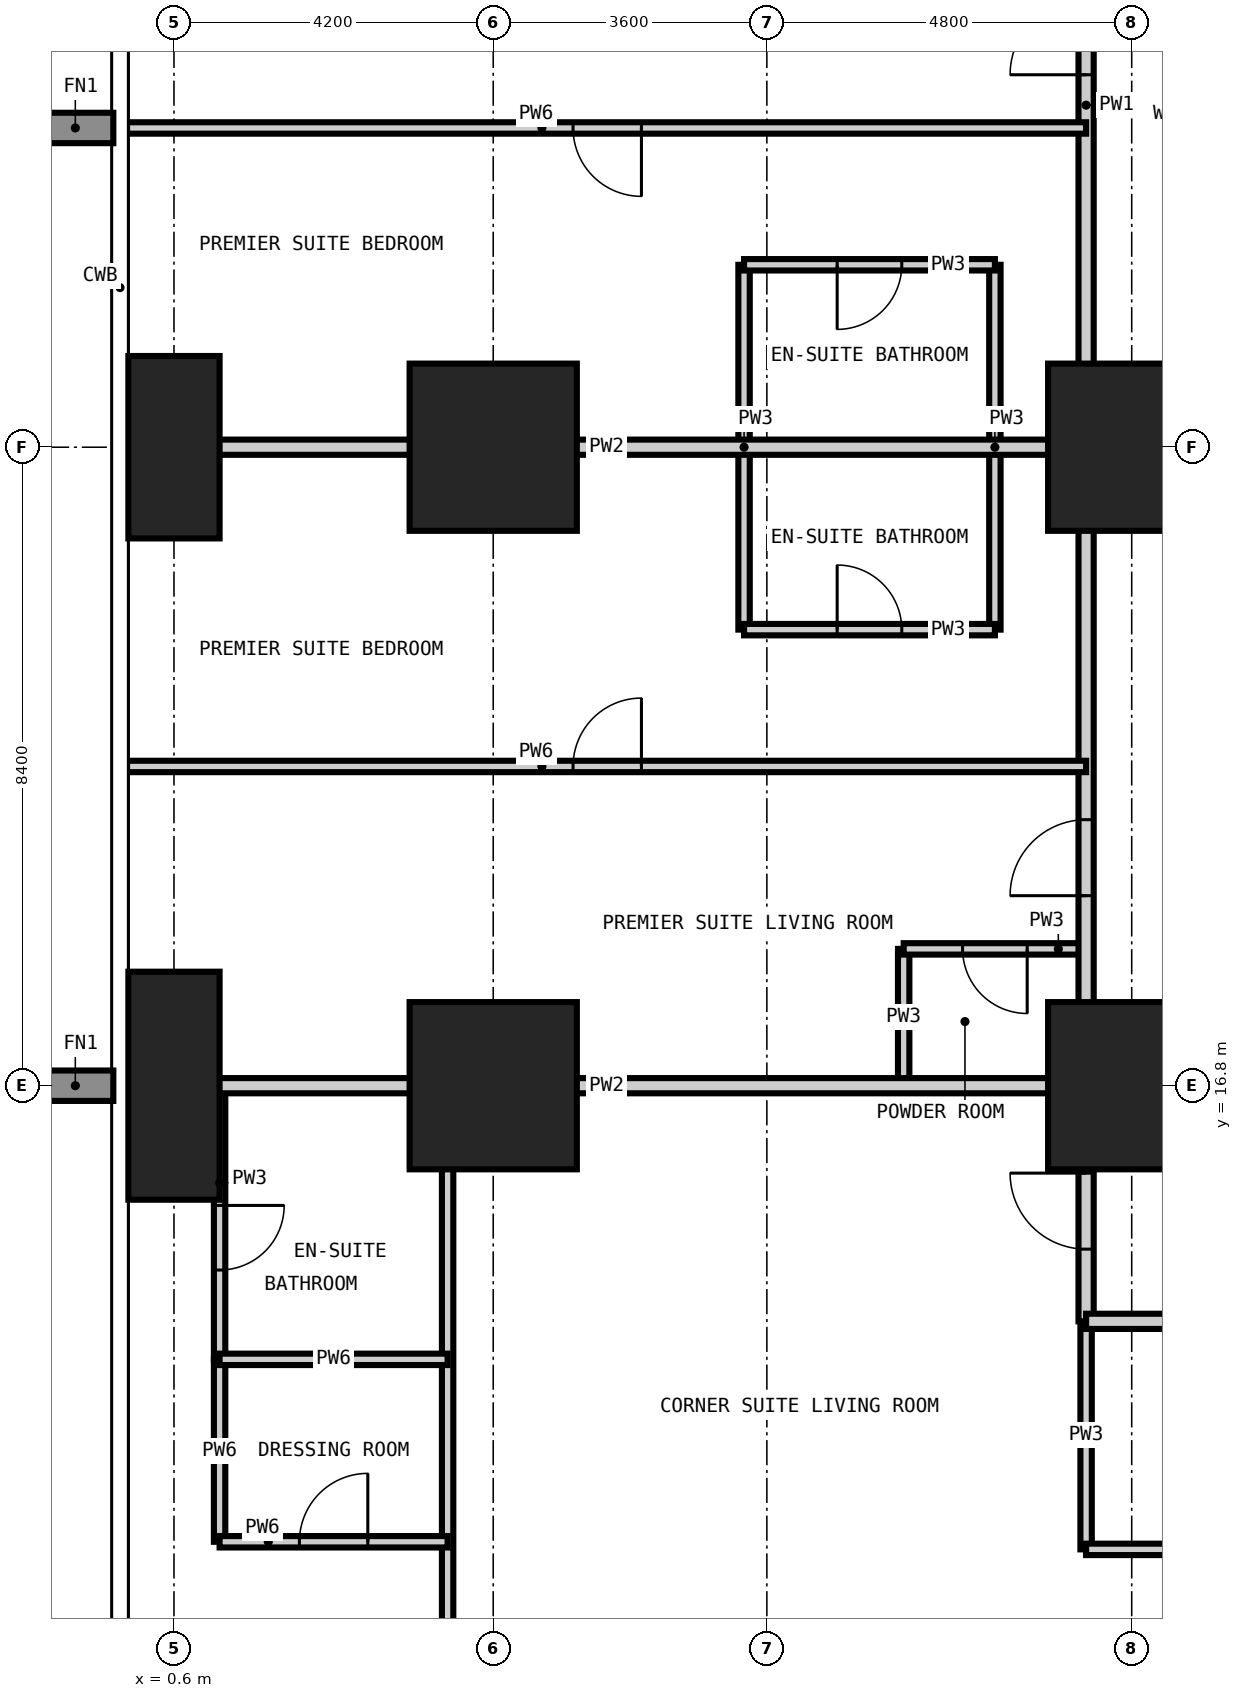
"""IFC4 building model, lengths in metres.
Left out: names, types, materials, properties, quantities, classifications, styles, units other than length and angle.
Written with IfcOpenShell. Run it as: python <this file> out.ifc"""

import sys

from ifc_helpers import new_model, si_unit, direction, frame, frame_2d, origin, origin_2d, place, context, subcontext, project, spatial, rectangle, extrude, element, fill, save


model = new_model("IFC4")
c1 = context("Model", 3, precision=1e-05, world=origin(), true_north=direction((0.0, 1.0)))
c2 = subcontext(c1, "Body", "Model", "MODEL_VIEW")
j1 = project(units=[si_unit("LENGTHUNIT", "METRE"), si_unit("PLANEANGLEUNIT", "RADIAN")], contexts=[c1])
p1 = place(None, origin())
s1 = spatial("IfcSite", under=j1, at=p1, CompositionType="ELEMENT")
p2 = place(p1, origin())
s2 = spatial("IfcBuilding", under=s1, at=p2, CompositionType="ELEMENT")
p3 = place(p2, frame((0.0, 0.0, 97.2)))
s3 = spatial("IfcBuildingStorey", under=s2, at=p3, CompositionType="ELEMENT", Elevation=97.2)
p4 = place(p3, frame((0.6, 16.8, -0.35), z_axis=(0.0, 0.0, 1.0), x_axis=(1.0, 0.0, 0.0)))
e1 = element("IfcColumn", 1, at=p4, inside=s3, PredefinedType="COLUMN", context=c2, shape_type="SweptSolid", body=[
    extrude(rectangle(XDim=1.2, YDim=3.0, at=origin_2d()), origin(), (0.0, 0.0, 1.0), 3.6),
])
p5 = place(p3, frame((0.6, 25.2, -0.35), z_axis=(0.0, 0.0, 1.0), x_axis=(1.0, 0.0, 0.0)))
e2 = element("IfcColumn", 2, at=p5, inside=s3, PredefinedType="COLUMN", context=c2, shape_type="SweptSolid", body=[
    extrude(rectangle(XDim=1.2, YDim=2.4, at=origin_2d()), origin(), (0.0, 0.0, 1.0), 3.6),
])
for number, where, z_axis, x_axis in (
    (3, (4.8, 16.8, -0.35), (0.0, 0.0, 1.0), (1.0, 0.0, 0.0)),
    (4, (4.8, 25.2, -0.35), (0.0, 0.0, 1.0), (1.0, 0.0, 0.0)),
    (5, (13.2, 16.8, -0.35), (0.0, 0.0, 1.0), (1.0, 0.0, 0.0)),
    (6, (13.2, 25.2, -0.35), (0.0, 0.0, 1.0), (1.0, 0.0, 0.0)),
):
    element("IfcColumn", number, at=place(p3, frame(where, z_axis=z_axis, x_axis=x_axis)), inside=s3, PredefinedType="COLUMN", context=c2, shape_type="SweptSolid", body=[
        extrude(rectangle(XDim=2.2, YDim=2.2, at=origin_2d()), origin(), (0.0, 0.0, 1.0), 3.6),
    ])
p6 = place(p3, frame((1.2, 13.2, 0.0), z_axis=(0.0, 0.0, 1.0), x_axis=(0.0, 1.0, 0.0)))
e7 = element("IfcWall", 7, at=p6, inside=s3, PredefinedType="PARTITIONING", context=c2, shape_type="SweptSolid", body=[
    extrude(rectangle(XDim=3.6, YDim=0.15, at=frame_2d((1.8, 0.0))), origin(), (0.0, 0.0, 1.0), 3.25),
])
p7 = place(p6, frame((1.175, 0.0, 0.0)))
e8 = element("IfcOpeningElement", 8, at=p7, cuts=e7, PredefinedType="OPENING", context=c2, shape_type="SweptSolid", body=[
    extrude(rectangle(XDim=0.85, YDim=2.1, at=frame_2d((0.425, 1.05))), frame((0.0, 0.085, 0.0), z_axis=(0.0, -1.0, 0.0), x_axis=(1.0, 0.0, 0.0)), (0.0, 0.0, 1.0), 0.17),
])
p8 = place(p3, frame((8.1, 22.8, 0.0), z_axis=(0.0, 0.0, 1.0), x_axis=(0.0, 1.0, 0.0)))
e9 = element("IfcWall", 9, at=p8, inside=s3, PredefinedType="PARTITIONING", context=c2, shape_type="SweptSolid", body=[
    extrude(rectangle(XDim=4.8, YDim=0.15, at=frame_2d((2.4, 0.0))), origin(), (0.0, 0.0, 1.0), 3.25),
])
p9 = place(p3, frame((10.2, 16.8, 0.0), z_axis=(0.0, 0.0, 1.0), x_axis=(0.0, 1.0, 0.0)))
e10 = element("IfcWall", 10, at=p9, inside=s3, PredefinedType="PARTITIONING", context=c2, shape_type="SweptSolid", body=[
    extrude(rectangle(XDim=1.8, YDim=0.15, at=frame_2d((0.9, 0.0))), origin(), (0.0, 0.0, 1.0), 3.25),
])
p10 = place(p3, frame((11.4, 22.8, 0.0), z_axis=(0.0, 0.0, 1.0), x_axis=(0.0, 1.0, 0.0)))
e11 = element("IfcWall", 11, at=p10, inside=s3, PredefinedType="PARTITIONING", context=c2, shape_type="SweptSolid", body=[
    extrude(rectangle(XDim=4.8, YDim=0.15, at=frame_2d((2.4, 0.0))), origin(), (0.0, 0.0, 1.0), 3.25),
])
p11 = place(p3, frame((12.6, 10.7, 0.0), z_axis=(0.0, 0.0, 1.0), x_axis=(0.0, 1.0, 0.0)))
e12 = element("IfcWall", 12, at=p11, inside=s3, PredefinedType="PARTITIONING", context=c2, shape_type="SweptSolid", body=[
    extrude(rectangle(XDim=3.0, YDim=0.15, at=frame_2d((1.5, 0.0))), origin(), (0.0, 0.0, 1.0), 3.25),
])
p12 = place(p3, frame((12.6, 10.7, 0.0), z_axis=(0.0, 0.0, 1.0), x_axis=(1.0, 0.0, 0.0)))
e13 = element("IfcWall", 13, at=p12, inside=s3, PredefinedType="PARTITIONING", context=c2, shape_type="SweptSolid", body=[
    extrude(rectangle(XDim=4.2, YDim=0.15, at=frame_2d((2.1, 0.0))), origin(), (0.0, 0.0, 1.0), 3.25),
])
p13 = place(p12, frame((1.675, 0.0, 0.0)))
e14 = element("IfcOpeningElement", 14, at=p13, cuts=e13, PredefinedType="OPENING", context=c2, shape_type="SweptSolid", body=[
    extrude(rectangle(XDim=0.85, YDim=2.1, at=frame_2d((0.425, 1.05))), frame((0.0, 0.085, 0.0), z_axis=(0.0, -1.0, 0.0), x_axis=(1.0, 0.0, 0.0)), (0.0, 0.0, 1.0), 0.17),
])
p14 = place(p3, frame((10.2, 18.6, 0.0), z_axis=(0.0, 0.0, 1.0), x_axis=(1.0, 0.0, 0.0)))
e15 = element("IfcWall", 15, at=p14, inside=s3, PredefinedType="PARTITIONING", context=c2, shape_type="SweptSolid", body=[
    extrude(rectangle(XDim=2.4, YDim=0.15, at=frame_2d((1.2, 0.0))), origin(), (0.0, 0.0, 1.0), 3.25),
])
p15 = place(p14, frame((0.775, 0.0, 0.0)))
e16 = element("IfcOpeningElement", 16, at=p15, cuts=e15, PredefinedType="OPENING", context=c2, shape_type="SweptSolid", body=[
    extrude(rectangle(XDim=0.85, YDim=2.1, at=frame_2d((0.425, 1.05))), frame((0.0, 0.085, 0.0), z_axis=(0.0, -1.0, 0.0), x_axis=(1.0, 0.0, 0.0)), (0.0, 0.0, 1.0), 0.17),
])
p16 = place(p3, frame((8.1, 22.8, 0.0), z_axis=(0.0, 0.0, 1.0), x_axis=(1.0, 0.0, 0.0)))
e17 = element("IfcWall", 17, at=p16, inside=s3, PredefinedType="PARTITIONING", context=c2, shape_type="SweptSolid", body=[
    extrude(rectangle(XDim=3.3, YDim=0.15, at=frame_2d((1.65, 0.0))), origin(), (0.0, 0.0, 1.0), 3.25),
])
p17 = place(p16, frame((1.225, 0.0, 0.0)))
e18 = element("IfcOpeningElement", 18, at=p17, cuts=e17, PredefinedType="OPENING", context=c2, shape_type="SweptSolid", body=[
    extrude(rectangle(XDim=0.85, YDim=2.1, at=frame_2d((0.425, 1.05))), frame((0.0, 0.085, 0.0), z_axis=(0.0, -1.0, 0.0), x_axis=(1.0, 0.0, 0.0)), (0.0, 0.0, 1.0), 0.17),
])
p18 = place(p3, frame((8.1, 27.6, 0.0), z_axis=(0.0, 0.0, 1.0), x_axis=(1.0, 0.0, 0.0)))
e19 = element("IfcWall", 19, at=p18, inside=s3, PredefinedType="PARTITIONING", context=c2, shape_type="SweptSolid", body=[
    extrude(rectangle(XDim=3.3, YDim=0.15, at=frame_2d((1.65, 0.0))), origin(), (0.0, 0.0, 1.0), 3.25),
])
p19 = place(p18, frame((1.225, 0.0, 0.0)))
e20 = element("IfcOpeningElement", 20, at=p19, cuts=e19, PredefinedType="OPENING", context=c2, shape_type="SweptSolid", body=[
    extrude(rectangle(XDim=0.85, YDim=2.1, at=frame_2d((0.425, 1.05))), frame((0.0, 0.085, 0.0), z_axis=(0.0, -1.0, 0.0), x_axis=(1.0, 0.0, 0.0)), (0.0, 0.0, 1.0), 0.17),
])
p20 = place(p3, frame((12.6, 13.7, 0.0), z_axis=(0.0, 0.0, 1.0), x_axis=(0.0, 1.0, 0.0)))
e21 = element("IfcWall", 21, at=p20, inside=s3, PredefinedType="PARTITIONING", context=c2, shape_type="SweptSolid", body=[
    extrude(rectangle(XDim=32.0, YDim=0.2, at=frame_2d((16.0, 0.0))), origin(), (0.0, 0.0, 1.0), 3.25),
])
p21 = place(p20, frame((5.6, 0.0, 0.0)))
e22 = element("IfcOpeningElement", 22, at=p21, cuts=e21, PredefinedType="OPENING", context=c2, shape_type="SweptSolid", body=[
    extrude(rectangle(XDim=1.0, YDim=2.2, at=frame_2d((0.5, 1.1))), frame((0.0, 0.11, 0.0), z_axis=(0.0, -1.0, 0.0), x_axis=(1.0, 0.0, 0.0)), (0.0, 0.0, 1.0), 0.22),
])
p22 = place(p20, frame((16.4, 0.0, 0.0)))
e23 = element("IfcOpeningElement", 23, at=p22, cuts=e21, PredefinedType="OPENING", context=c2, shape_type="SweptSolid", body=[
    extrude(rectangle(XDim=1.0, YDim=2.2, at=frame_2d((0.5, 1.1))), frame((0.0, 0.11, 0.0), z_axis=(0.0, -1.0, 0.0), x_axis=(1.0, 0.0, 0.0)), (0.0, 0.0, 1.0), 0.22),
])
p23 = place(p20, frame((22.4, 0.0, 0.0)))
e24 = element("IfcOpeningElement", 24, at=p23, cuts=e21, PredefinedType="OPENING", context=c2, shape_type="SweptSolid", body=[
    extrude(rectangle(XDim=1.0, YDim=2.2, at=frame_2d((0.5, 1.1))), frame((0.0, 0.11, 0.0), z_axis=(0.0, -1.0, 0.0), x_axis=(1.0, 0.0, 0.0)), (0.0, 0.0, 1.0), 0.22),
])
p24 = place(p20, frame((0.95, 0.0, 0.0)))
e25 = element("IfcOpeningElement", 25, at=p24, cuts=e21, PredefinedType="OPENING", context=c2, shape_type="SweptSolid", body=[
    extrude(rectangle(XDim=1.0, YDim=2.2, at=frame_2d((0.5, 1.1))), frame((0.0, 0.11, 0.0), z_axis=(0.0, -1.0, 0.0), x_axis=(1.0, 0.0, 0.0)), (0.0, 0.0, 1.0), 0.22),
])
p25 = place(p20, frame((29.65, 0.0, 0.0)))
e26 = element("IfcOpeningElement", 26, at=p25, cuts=e21, PredefinedType="OPENING", context=c2, shape_type="SweptSolid", body=[
    extrude(rectangle(XDim=1.0, YDim=2.2, at=frame_2d((0.5, 1.1))), frame((0.0, 0.11, 0.0), z_axis=(0.0, -1.0, 0.0), x_axis=(1.0, 0.0, 0.0)), (0.0, 0.0, 1.0), 0.22),
])
p26 = place(p3, frame((44.5, 13.7, 0.0), z_axis=(0.0, 0.0, 1.0), x_axis=(-1.0, 0.0, 0.0)))
e27 = element("IfcWall", 27, at=p26, inside=s3, PredefinedType="PARTITIONING", context=c2, shape_type="SweptSolid", body=[
    extrude(rectangle(XDim=31.9, YDim=0.2, at=frame_2d((15.95, 0.0))), origin(), (0.0, 0.0, 1.0), 3.25),
])
p27 = place(p26, frame((23.0, 0.0, 0.0)))
e28 = element("IfcOpeningElement", 28, at=p27, cuts=e27, PredefinedType="OPENING", context=c2, shape_type="SweptSolid", body=[
    extrude(rectangle(XDim=1.0, YDim=2.2, at=frame_2d((0.5, 1.1))), frame((0.0, 0.11, 0.0), z_axis=(0.0, -1.0, 0.0), x_axis=(1.0, 0.0, 0.0)), (0.0, 0.0, 1.0), 0.22),
])
p28 = place(p26, frame((14.6, 0.0, 0.0)))
e29 = element("IfcOpeningElement", 29, at=p28, cuts=e27, PredefinedType="OPENING", context=c2, shape_type="SweptSolid", body=[
    extrude(rectangle(XDim=1.0, YDim=2.2, at=frame_2d((0.5, 1.1))), frame((0.0, 0.11, 0.0), z_axis=(0.0, -1.0, 0.0), x_axis=(1.0, 0.0, 0.0)), (0.0, 0.0, 1.0), 0.22),
])
p29 = place(p26, frame((6.2, 0.0, 0.0)))
e30 = element("IfcOpeningElement", 30, at=p29, cuts=e27, PredefinedType="OPENING", context=c2, shape_type="SweptSolid", body=[
    extrude(rectangle(XDim=1.0, YDim=2.2, at=frame_2d((0.5, 1.1))), frame((0.0, 0.11, 0.0), z_axis=(0.0, -1.0, 0.0), x_axis=(1.0, 0.0, 0.0)), (0.0, 0.0, 1.0), 0.22),
])
for number, where, z_axis, x_axis in (
    (31, (-0.018, 16.8, 0.0), (0.0, 0.0, 1.0), (1.0, 0.0, 0.0)),
    (32, (-0.018, 25.2, 0.0), (0.0, 0.0, 1.0), (1.0, 0.0, 0.0)),
):
    element("IfcWall", number, at=place(p3, frame(where, z_axis=z_axis, x_axis=x_axis)), inside=s3, PredefinedType="PARTITIONING", context=c2, shape_type="SweptSolid", body=[
        extrude(rectangle(XDim=12.618, YDim=0.2, at=frame_2d((6.309, 0.0))), origin(), (0.0, 0.0, 1.0), 3.25),
    ])
p30 = place(p3, frame((1.2, 10.8, 0.0), z_axis=(0.0, 0.0, 1.0), x_axis=(0.0, 1.0, 0.0)))
e33 = element("IfcWall", 33, at=p30, inside=s3, PredefinedType="PARTITIONING", context=c2, shape_type="SweptSolid", body=[
    extrude(rectangle(XDim=2.4, YDim=0.15, at=frame_2d((1.2, 0.0))), origin(), (0.0, 0.0, 1.0), 3.25),
])
p31 = place(p3, frame((4.2, -0.018, 0.0), z_axis=(0.0, 0.0, 1.0), x_axis=(0.0, 1.0, 0.0)))
e34 = element("IfcWall", 34, at=p31, inside=s3, PredefinedType="PARTITIONING", context=c2, shape_type="SweptSolid", body=[
    extrude(rectangle(XDim=16.818, YDim=0.15, at=frame_2d((8.409, 0.0))), origin(), (0.0, 0.0, 1.0), 3.25),
])
p32 = place(p31, frame((4.968, 0.0, 0.0)))
e35 = element("IfcOpeningElement", 35, at=p32, cuts=e34, PredefinedType="OPENING", context=c2, shape_type="SweptSolid", body=[
    extrude(rectangle(XDim=0.9, YDim=2.1, at=frame_2d((0.45, 1.05))), frame((0.0, 0.085, 0.0), z_axis=(0.0, -1.0, 0.0), x_axis=(1.0, 0.0, 0.0)), (0.0, 0.0, 1.0), 0.17),
])
p33 = place(p3, frame((1.2, 10.8, 0.0), z_axis=(0.0, 0.0, 1.0), x_axis=(1.0, 0.0, 0.0)))
e36 = element("IfcWall", 36, at=p33, inside=s3, PredefinedType="PARTITIONING", context=c2, shape_type="SweptSolid", body=[
    extrude(rectangle(XDim=3.0, YDim=0.15, at=frame_2d((1.5, 0.0))), origin(), (0.0, 0.0, 1.0), 3.25),
])
p34 = place(p33, frame((1.05, 0.0, 0.0)))
e37 = element("IfcOpeningElement", 37, at=p34, cuts=e36, PredefinedType="OPENING", context=c2, shape_type="SweptSolid", body=[
    extrude(rectangle(XDim=0.9, YDim=2.1, at=frame_2d((0.45, 1.05))), frame((0.0, 0.085, 0.0), z_axis=(0.0, -1.0, 0.0), x_axis=(1.0, 0.0, 0.0)), (0.0, 0.0, 1.0), 0.17),
])
p35 = place(p3, frame((1.2, 13.2, 0.0), z_axis=(0.0, 0.0, 1.0), x_axis=(1.0, 0.0, 0.0)))
e38 = element("IfcWall", 38, at=p35, inside=s3, PredefinedType="PARTITIONING", context=c2, shape_type="SweptSolid", body=[
    extrude(rectangle(XDim=3.0, YDim=0.15, at=frame_2d((1.5, 0.0))), origin(), (0.0, 0.0, 1.0), 3.25),
])
p36 = place(p3, frame((-0.018, 21.0, 0.0), z_axis=(0.0, 0.0, 1.0), x_axis=(1.0, 0.0, 0.0)))
e39 = element("IfcWall", 39, at=p36, inside=s3, PredefinedType="PARTITIONING", context=c2, shape_type="SweptSolid", body=[
    extrude(rectangle(XDim=12.618, YDim=0.15, at=frame_2d((6.309, 0.0))), origin(), (0.0, 0.0, 1.0), 3.25),
])
p37 = place(p36, frame((5.868, 0.0, 0.0)))
e40 = element("IfcOpeningElement", 40, at=p37, cuts=e39, PredefinedType="OPENING", context=c2, shape_type="SweptSolid", body=[
    extrude(rectangle(XDim=0.9, YDim=2.1, at=frame_2d((0.45, 1.05))), frame((0.0, 0.085, 0.0), z_axis=(0.0, -1.0, 0.0), x_axis=(1.0, 0.0, 0.0)), (0.0, 0.0, 1.0), 0.17),
])
p38 = place(p3, frame((-0.018, 29.4, 0.0), z_axis=(0.0, 0.0, 1.0), x_axis=(1.0, 0.0, 0.0)))
e41 = element("IfcWall", 41, at=p38, inside=s3, PredefinedType="PARTITIONING", context=c2, shape_type="SweptSolid", body=[
    extrude(rectangle(XDim=12.618, YDim=0.15, at=frame_2d((6.309, 0.0))), origin(), (0.0, 0.0, 1.0), 3.25),
])
p39 = place(p38, frame((5.868, 0.0, 0.0)))
e42 = element("IfcOpeningElement", 42, at=p39, cuts=e41, PredefinedType="OPENING", context=c2, shape_type="SweptSolid", body=[
    extrude(rectangle(XDim=0.9, YDim=2.1, at=frame_2d((0.45, 1.05))), frame((0.0, 0.085, 0.0), z_axis=(0.0, -1.0, 0.0), x_axis=(1.0, 0.0, 0.0)), (0.0, 0.0, 1.0), 0.17),
])
p40 = place(p21, origin())
e43 = element("IfcDoor", 43, at=p40, inside=s3, OperationType="SINGLE_SWING_LEFT", PredefinedType="DOOR", context=c2, shape_type="SweptSolid", body=[
    extrude(rectangle(XDim=1.0, YDim=2.2, at=frame_2d((0.5, 1.1))), frame((0.0, 0.025, 0.0), z_axis=(0.0, -1.0, 0.0), x_axis=(1.0, 0.0, 0.0)), (0.0, 0.0, 1.0), 0.05),
])
fill(e22, e43)
p41 = place(p15, frame((0.85, 0.0, 0.0), z_axis=(0.0, 0.0, 1.0), x_axis=(-1.0, 0.0, 0.0)))
e44 = element("IfcDoor", 44, at=p41, inside=s3, OperationType="SINGLE_SWING_LEFT", PredefinedType="DOOR", context=c2, shape_type="SweptSolid", body=[
    extrude(rectangle(XDim=0.85, YDim=2.1, at=frame_2d((0.425, 1.05))), frame((0.0, 0.025, 0.0), z_axis=(0.0, -1.0, 0.0), x_axis=(1.0, 0.0, 0.0)), (0.0, 0.0, 1.0), 0.05),
])
fill(e16, e44)
p42 = place(p37, origin())
e45 = element("IfcDoor", 45, at=p42, inside=s3, OperationType="SINGLE_SWING_RIGHT", PredefinedType="DOOR", context=c2, shape_type="SweptSolid", body=[
    extrude(rectangle(XDim=0.9, YDim=2.1, at=frame_2d((0.45, 1.05))), frame((0.0, 0.025, 0.0), z_axis=(0.0, -1.0, 0.0), x_axis=(1.0, 0.0, 0.0)), (0.0, 0.0, 1.0), 0.05),
])
fill(e40, e45)
p43 = place(p17, origin())
e46 = element("IfcDoor", 46, at=p43, inside=s3, OperationType="SINGLE_SWING_LEFT", PredefinedType="DOOR", context=c2, shape_type="SweptSolid", body=[
    extrude(rectangle(XDim=0.85, YDim=2.1, at=frame_2d((0.425, 1.05))), frame((0.0, 0.025, 0.0), z_axis=(0.0, -1.0, 0.0), x_axis=(1.0, 0.0, 0.0)), (0.0, 0.0, 1.0), 0.05),
])
fill(e18, e46)
p44 = place(p22, origin())
e47 = element("IfcDoor", 47, at=p44, inside=s3, OperationType="SINGLE_SWING_LEFT", PredefinedType="DOOR", context=c2, shape_type="SweptSolid", body=[
    extrude(rectangle(XDim=1.0, YDim=2.2, at=frame_2d((0.5, 1.1))), frame((0.0, 0.025, 0.0), z_axis=(0.0, -1.0, 0.0), x_axis=(1.0, 0.0, 0.0)), (0.0, 0.0, 1.0), 0.05),
])
fill(e23, e47)
p45 = place(p39, frame((0.9, 0.0, 0.0), z_axis=(0.0, 0.0, 1.0), x_axis=(-1.0, 0.0, 0.0)))
e48 = element("IfcDoor", 48, at=p45, inside=s3, OperationType="SINGLE_SWING_LEFT", PredefinedType="DOOR", context=c2, shape_type="SweptSolid", body=[
    extrude(rectangle(XDim=0.9, YDim=2.1, at=frame_2d((0.45, 1.05))), frame((0.0, 0.025, 0.0), z_axis=(0.0, -1.0, 0.0), x_axis=(1.0, 0.0, 0.0)), (0.0, 0.0, 1.0), 0.05),
])
fill(e42, e48)
p46 = place(p19, frame((0.85, 0.0, 0.0), z_axis=(0.0, 0.0, 1.0), x_axis=(-1.0, 0.0, 0.0)))
e49 = element("IfcDoor", 49, at=p46, inside=s3, OperationType="SINGLE_SWING_RIGHT", PredefinedType="DOOR", context=c2, shape_type="SweptSolid", body=[
    extrude(rectangle(XDim=0.85, YDim=2.1, at=frame_2d((0.425, 1.05))), frame((0.0, 0.025, 0.0), z_axis=(0.0, -1.0, 0.0), x_axis=(1.0, 0.0, 0.0)), (0.0, 0.0, 1.0), 0.05),
])
fill(e20, e49)
p47 = place(p24, origin())
e50 = element("IfcDoor", 50, at=p47, inside=s3, OperationType="SINGLE_SWING_RIGHT", PredefinedType="DOOR", context=c2, shape_type="SweptSolid", body=[
    extrude(rectangle(XDim=1.0, YDim=2.2, at=frame_2d((0.5, 1.1))), frame((0.0, 0.025, 0.0), z_axis=(0.0, -1.0, 0.0), x_axis=(1.0, 0.0, 0.0)), (0.0, 0.0, 1.0), 0.05),
])
fill(e25, e50)
p48 = place(p7, frame((0.85, 0.0, 0.0), z_axis=(0.0, 0.0, 1.0), x_axis=(-1.0, 0.0, 0.0)))
e51 = element("IfcDoor", 51, at=p48, inside=s3, OperationType="SINGLE_SWING_LEFT", PredefinedType="DOOR", context=c2, shape_type="SweptSolid", body=[
    extrude(rectangle(XDim=0.85, YDim=2.1, at=frame_2d((0.425, 1.05))), frame((0.0, 0.025, 0.0), z_axis=(0.0, -1.0, 0.0), x_axis=(1.0, 0.0, 0.0)), (0.0, 0.0, 1.0), 0.05),
])
fill(e8, e51)
p49 = place(p34, origin())
e52 = element("IfcDoor", 52, at=p49, inside=s3, OperationType="SINGLE_SWING_RIGHT", PredefinedType="DOOR", context=c2, shape_type="SweptSolid", body=[
    extrude(rectangle(XDim=0.9, YDim=2.1, at=frame_2d((0.45, 1.05))), frame((0.0, 0.025, 0.0), z_axis=(0.0, -1.0, 0.0), x_axis=(1.0, 0.0, 0.0)), (0.0, 0.0, 1.0), 0.05),
])
fill(e37, e52)
save(model, sys.argv[1])
